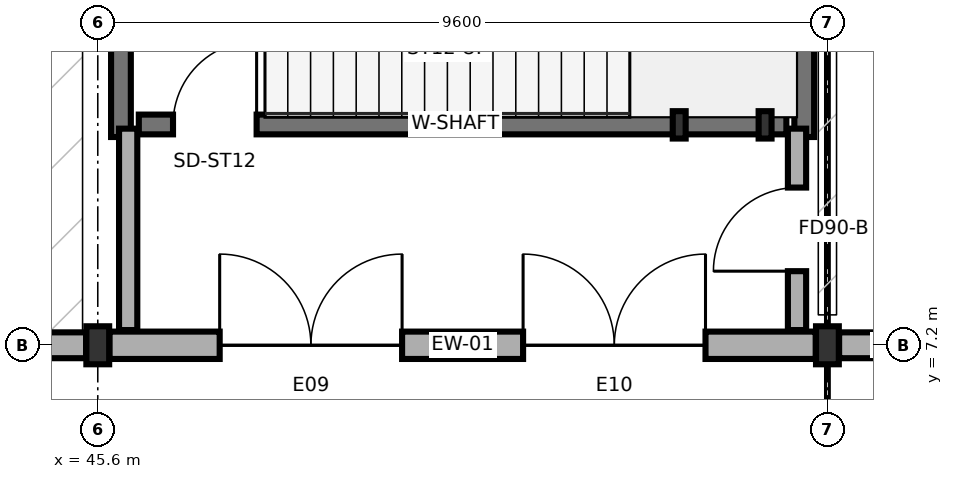
"""IFC4 building model, lengths in metres.
Left out: names, types, materials, properties, quantities, classifications, styles, units other than length and angle.
Written with IfcOpenShell. Run it as: python <this file> out.ifc"""

import sys

from ifc_helpers import new_model, si_unit, direction, frame, frame_2d, origin, origin_2d, place, context, subcontext, project, spatial, rectangle, i_section, extrude, element, fill, save


model = new_model("IFC4")
c1 = context("Model", 3, precision=1e-05, world=origin(), true_north=direction((0.0, 1.0)))
c2 = subcontext(c1, "Body", "Model", "MODEL_VIEW")
j1 = project(units=[si_unit("LENGTHUNIT", "METRE"), si_unit("PLANEANGLEUNIT", "RADIAN")], contexts=[c1])
p1 = place(None, origin())
s1 = spatial("IfcSite", under=j1, at=p1, CompositionType="ELEMENT")
p2 = place(p1, origin())
s2 = spatial("IfcBuilding", under=s1, at=p2, CompositionType="ELEMENT")
p3 = place(p2, origin())
s3 = spatial("IfcBuildingStorey", under=s2, at=p3, CompositionType="ELEMENT", Elevation=0.0)
for number, where, z_axis, x_axis in (
    (1, (45.6, 7.2, 0.0), (0.0, 0.0, 1.0), (1.0, 0.0, 0.0)),
    (2, (55.2, 7.2, 0.0), (0.0, 0.0, 1.0), (1.0, 0.0, 0.0)),
):
    element("IfcColumn", number, at=place(p3, frame(where, z_axis=z_axis, x_axis=x_axis)), inside=s3, PredefinedType="COLUMN", context=c2, shape_type="SweptSolid", body=[
        extrude(i_section(OverallWidth=0.3, OverallDepth=0.5, WebThickness=0.014, FlangeThickness=0.028, FilletRadius=0.027, at=origin_2d()), origin(), (0.0, 0.0, 1.0), 5.4),
    ])
for number, where, z_axis, x_axis in (
    (3, (53.25, 10.1, 0.0), (0.0, 0.0, 1.0), (1.0, 0.0, 0.0)),
    (4, (54.38, 10.1, 0.0), (0.0, 0.0, 1.0), (1.0, 0.0, 0.0)),
):
    element("IfcColumn", number, at=place(p3, frame(where, z_axis=z_axis, x_axis=x_axis)), inside=s3, PredefinedType="PILASTER", context=c2, shape_type="SweptSolid", body=[
        extrude(i_section(OverallWidth=0.17, OverallDepth=0.36, WebThickness=0.008, FlangeThickness=0.013, FilletRadius=0.018, at=origin_2d()), origin(), (0.0, 0.0, 1.0), 5.4),
    ])
p4 = place(p3, frame((36.154, 7.2, 0.0), z_axis=(0.0, 0.0, 1.0), x_axis=(1.0, 0.0, 0.0)))
e5 = element("IfcWall", 5, at=p4, inside=s3, PredefinedType="SOLIDWALL", context=c2, shape_type="SweptSolid", body=[
    extrude(rectangle(XDim=9.292, YDim=0.34, at=frame_2d((4.646, 0.0))), origin(), (0.0, 0.0, 1.0), 4.625),
])
p5 = place(p4, frame((1.45, 0.0, 0.0)))
e6 = element("IfcOpeningElement", 6, at=p5, cuts=e5, PredefinedType="OPENING", context=c2, shape_type="SweptSolid", body=[
    extrude(rectangle(XDim=2.4, YDim=2.4, at=frame_2d((1.2, 1.2))), frame((0.0, 0.18, 0.0), z_axis=(0.0, -1.0, 0.0), x_axis=(1.0, 0.0, 0.0)), (0.0, 0.0, 1.0), 0.36),
])
p6 = place(p4, frame((5.442, 0.0, 0.0)))
e7 = element("IfcOpeningElement", 7, at=p6, cuts=e5, PredefinedType="OPENING", context=c2, shape_type="SweptSolid", body=[
    extrude(rectangle(XDim=2.4, YDim=2.4, at=frame_2d((1.2, 1.2))), frame((0.0, 0.18, 0.0), z_axis=(0.0, -1.0, 0.0), x_axis=(1.0, 0.0, 0.0)), (0.0, 0.0, 1.0), 0.36),
])
p7 = place(p3, frame((45.754, 7.2, 0.0), z_axis=(0.0, 0.0, 1.0), x_axis=(1.0, 0.0, 0.0)))
e8 = element("IfcWall", 8, at=p7, inside=s3, PredefinedType="SOLIDWALL", context=c2, shape_type="SweptSolid", body=[
    extrude(rectangle(XDim=9.292, YDim=0.36, at=frame_2d((4.646, 0.0))), origin(), (0.0, 0.0, 1.0), 4.625),
])
p8 = place(p7, frame((1.45, 0.0, 0.0)))
e9 = element("IfcOpeningElement", 9, at=p8, cuts=e8, PredefinedType="OPENING", context=c2, shape_type="SweptSolid", body=[
    extrude(rectangle(XDim=2.4, YDim=2.4, at=frame_2d((1.2, 1.2))), frame((0.0, 0.19, 0.0), z_axis=(0.0, -1.0, 0.0), x_axis=(1.0, 0.0, 0.0)), (0.0, 0.0, 1.0), 0.38),
])
p9 = place(p7, frame((5.442, 0.0, 0.0)))
e10 = element("IfcOpeningElement", 10, at=p9, cuts=e8, PredefinedType="OPENING", context=c2, shape_type="SweptSolid", body=[
    extrude(rectangle(XDim=2.4, YDim=2.4, at=frame_2d((1.2, 1.2))), frame((0.0, 0.19, 0.0), z_axis=(0.0, -1.0, 0.0), x_axis=(1.0, 0.0, 0.0)), (0.0, 0.0, 1.0), 0.38),
])
p10 = place(p3, frame((55.354, 7.2, 0.0), z_axis=(0.0, 0.0, 1.0), x_axis=(1.0, 0.0, 0.0)))
e11 = element("IfcWall", 11, at=p10, inside=s3, PredefinedType="SOLIDWALL", context=c2, shape_type="SweptSolid", body=[
    extrude(rectangle(XDim=9.292, YDim=0.34, at=frame_2d((4.646, 0.0))), origin(), (0.0, 0.0, 1.0), 4.625),
])
p11 = place(p10, frame((1.45, 0.0, 0.0)))
e12 = element("IfcOpeningElement", 12, at=p11, cuts=e11, PredefinedType="OPENING", context=c2, shape_type="SweptSolid", body=[
    extrude(rectangle(XDim=2.4, YDim=2.4, at=frame_2d((1.2, 1.2))), frame((0.0, 0.18, 0.0), z_axis=(0.0, -1.0, 0.0), x_axis=(1.0, 0.0, 0.0)), (0.0, 0.0, 1.0), 0.36),
])
p12 = place(p10, frame((5.442, 0.0, 0.0)))
e13 = element("IfcOpeningElement", 13, at=p12, cuts=e11, PredefinedType="OPENING", context=c2, shape_type="SweptSolid", body=[
    extrude(rectangle(XDim=2.4, YDim=2.4, at=frame_2d((1.2, 1.2))), frame((0.0, 0.18, 0.0), z_axis=(0.0, -1.0, 0.0), x_axis=(1.0, 0.0, 0.0)), (0.0, 0.0, 1.0), 0.36),
])
for number, where, z_axis, x_axis in (
    (14, (45.905, 9.94, 0.0), (0.0, 0.0, 1.0), (0.0, 1.0, 0.0)),
    (15, (54.895, 9.94, 0.0), (0.0, 0.0, 1.0), (0.0, 1.0, 0.0)),
):
    element("IfcWall", number, at=place(p3, frame(where, z_axis=z_axis, x_axis=x_axis)), inside=s3, PredefinedType="SHEAR", context=c2, shape_type="SweptSolid", body=[
        extrude(rectangle(XDim=4.27, YDim=0.26, at=frame_2d((2.135, 0.0))), origin(), (0.0, 0.0, 1.0), 5.14),
    ])
p13 = place(p3, frame((46.14, 10.105, 0.0), z_axis=(0.0, 0.0, 1.0), x_axis=(1.0, 0.0, 0.0)))
e16 = element("IfcWall", 16, at=p13, inside=s3, PredefinedType="SHEAR", context=c2, shape_type="SweptSolid", body=[
    extrude(rectangle(XDim=8.52, YDim=0.26, at=frame_2d((4.26, 0.0))), origin(), (0.0, 0.0, 1.0), 5.14),
])
p14 = place(p13, frame((0.45, 0.0, 0.0)))
e17 = element("IfcOpeningElement", 17, at=p14, cuts=e16, PredefinedType="OPENING", context=c2, shape_type="SweptSolid", body=[
    extrude(rectangle(XDim=1.1, YDim=2.2, at=frame_2d((0.55, 1.1))), frame((0.0, 0.14, 0.0), z_axis=(0.0, -1.0, 0.0), x_axis=(1.0, 0.0, 0.0)), (0.0, 0.0, 1.0), 0.28),
])
p15 = place(p3, frame((46.0, 7.4, 0.0), z_axis=(0.0, 0.0, 1.0), x_axis=(0.0, 1.0, 0.0)))
e18 = element("IfcWall", 18, at=p15, inside=s3, PredefinedType="SOLIDWALL", context=c2, shape_type="SweptSolid", body=[
    extrude(rectangle(XDim=2.65, YDim=0.24, at=frame_2d((1.325, 0.0))), origin(), (0.0, 0.0, 1.0), 5.14),
])
p16 = place(p3, frame((54.8, 7.4, 0.0), z_axis=(0.0, 0.0, 1.0), x_axis=(0.0, 1.0, 0.0)))
e19 = element("IfcWall", 19, at=p16, inside=s3, PredefinedType="SOLIDWALL", context=c2, shape_type="SweptSolid", body=[
    extrude(rectangle(XDim=2.65, YDim=0.24, at=frame_2d((1.325, 0.0))), origin(), (0.0, 0.0, 1.0), 5.14),
])
p17 = place(p16, frame((0.775, 0.0, 0.0)))
e20 = element("IfcOpeningElement", 20, at=p17, cuts=e19, PredefinedType="OPENING", context=c2, shape_type="SweptSolid", body=[
    extrude(rectangle(XDim=1.1, YDim=2.2, at=frame_2d((0.55, 1.1))), frame((0.0, 0.13, 0.0), z_axis=(0.0, -1.0, 0.0), x_axis=(1.0, 0.0, 0.0)), (0.0, 0.0, 1.0), 0.26),
])
p18 = place(p8, frame((2.4, 0.0, 0.0), z_axis=(0.0, 0.0, 1.0), x_axis=(-1.0, 0.0, 0.0)))
e21 = element("IfcDoor", 21, at=p18, inside=s3, OperationType="DOUBLE_DOOR_SINGLE_SWING", PredefinedType="DOOR", context=c2, shape_type="SweptSolid", body=[
    extrude(rectangle(XDim=2.4, YDim=2.4, at=frame_2d((1.2, 1.2))), frame((0.0, 0.025, 0.0), z_axis=(0.0, -1.0, 0.0), x_axis=(1.0, 0.0, 0.0)), (0.0, 0.0, 1.0), 0.05),
])
fill(e9, e21)
p19 = place(p9, frame((2.4, 0.0, 0.0), z_axis=(0.0, 0.0, 1.0), x_axis=(-1.0, 0.0, 0.0)))
e22 = element("IfcDoor", 22, at=p19, inside=s3, OperationType="DOUBLE_DOOR_SINGLE_SWING", PredefinedType="DOOR", context=c2, shape_type="SweptSolid", body=[
    extrude(rectangle(XDim=2.4, YDim=2.4, at=frame_2d((1.2, 1.2))), frame((0.0, 0.025, 0.0), z_axis=(0.0, -1.0, 0.0), x_axis=(1.0, 0.0, 0.0)), (0.0, 0.0, 1.0), 0.05),
])
fill(e10, e22)
p20 = place(p14, origin())
e23 = element("IfcDoor", 23, at=p20, inside=s3, OperationType="SINGLE_SWING_RIGHT", PredefinedType="DOOR", context=c2, shape_type="SweptSolid", body=[
    extrude(rectangle(XDim=1.1, YDim=2.2, at=frame_2d((0.55, 1.1))), frame((0.0, 0.025, 0.0), z_axis=(0.0, -1.0, 0.0), x_axis=(1.0, 0.0, 0.0)), (0.0, 0.0, 1.0), 0.05),
])
fill(e17, e23)
p21 = place(p17, origin())
e24 = element("IfcDoor", 24, at=p21, inside=s3, OperationType="SINGLE_SWING_LEFT", PredefinedType="DOOR", context=c2, shape_type="SweptSolid", body=[
    extrude(rectangle(XDim=1.1, YDim=2.2, at=frame_2d((0.55, 1.1))), frame((0.0, 0.025, 0.0), z_axis=(0.0, -1.0, 0.0), x_axis=(1.0, 0.0, 0.0)), (0.0, 0.0, 1.0), 0.05),
])
fill(e20, e24)
save(model, sys.argv[1])
